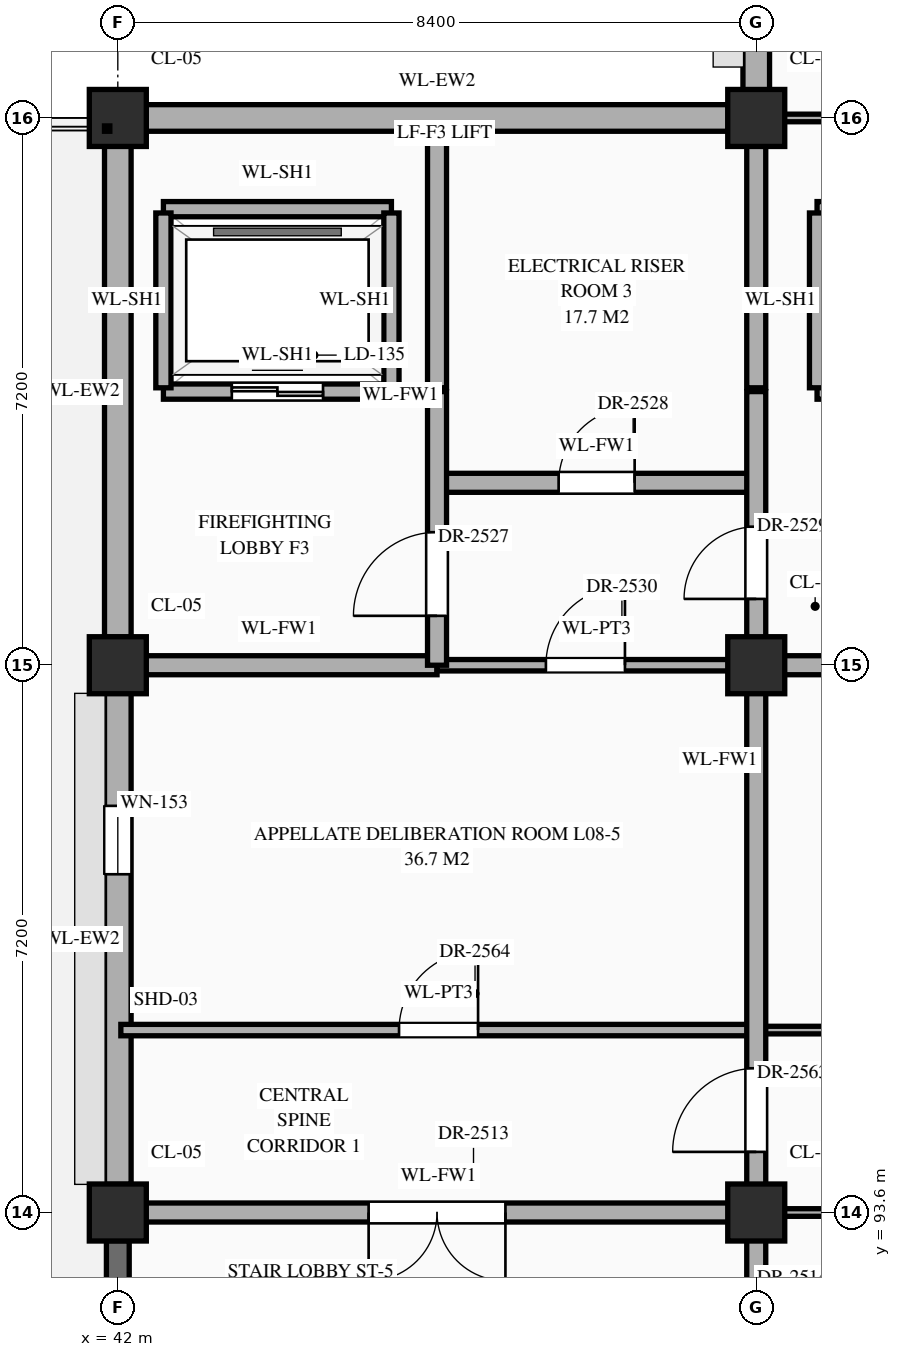
"""IFC4 building model, lengths in metres.
Left out: names, types, materials, properties, quantities, classifications, styles, units other than length and angle.
Written with IfcOpenShell. Run it as: python <this file> out.ifc"""

import sys

from ifc_helpers import new_model, si_unit, direction, frame, frame_2d, origin, origin_2d, place, context, subcontext, project, spatial, rectangle, extrude, element, fill, save


model = new_model("IFC4")
c1 = context("Model", 3, precision=1e-05, world=origin(), true_north=direction((0.0, 1.0)))
c2 = subcontext(c1, "Body", "Model", "MODEL_VIEW")
j1 = project(units=[si_unit("LENGTHUNIT", "METRE"), si_unit("PLANEANGLEUNIT", "RADIAN")], contexts=[c1])
p1 = place(None, origin())
s1 = spatial("IfcSite", under=j1, at=p1, CompositionType="ELEMENT")
p2 = place(p1, origin())
s2 = spatial("IfcBuilding", under=s1, at=p2, CompositionType="ELEMENT")
p3 = place(p2, frame((0.0, 0.0, 35.1)))
s3 = spatial("IfcBuildingStorey", under=s2, at=p3, CompositionType="ELEMENT", Elevation=35.1)
for number, where, z_axis, x_axis in (
    (1, (42.0, 93.6, 0.0), (0.0, 0.0, 1.0), (1.0, 0.0, 0.0)),
    (2, (42.0, 100.8, 0.0), (0.0, 0.0, 1.0), (1.0, 0.0, 0.0)),
    (3, (42.0, 108.0, 0.0), (0.0, 0.0, 1.0), (1.0, 0.0, 0.0)),
    (4, (50.4, 93.6, 0.0), (0.0, 0.0, 1.0), (1.0, 0.0, 0.0)),
    (5, (50.4, 100.8, 0.0), (0.0, 0.0, 1.0), (1.0, 0.0, 0.0)),
    (6, (50.4, 108.0, 0.0), (0.0, 0.0, 1.0), (1.0, 0.0, 0.0)),
):
    element("IfcColumn", number, at=place(p3, frame(where, z_axis=z_axis, x_axis=x_axis)), inside=s3, PredefinedType="COLUMN", context=c2, shape_type="SweptSolid", body=[
        extrude(rectangle(XDim=0.75, YDim=0.75, at=origin_2d()), origin(), (0.0, 0.0, 1.0), 4.2),
    ])
p4 = place(p3, frame((42.0, 86.77, 0.0), z_axis=(0.0, 0.0, 1.0), x_axis=(0.0, 1.0, 0.0)))
e7 = element("IfcWall", 7, at=p4, inside=s3, PredefinedType="SHEAR", context=c2, shape_type="SweptSolid", body=[
    extrude(rectangle(XDim=6.46, YDim=0.3, at=frame_2d((3.23, 0.0))), origin(), (0.0, 0.0, 1.0), 3.95),
])
p5 = place(p3, frame((42.0, 93.97, 0.0), z_axis=(0.0, 0.0, 1.0), x_axis=(0.0, 1.0, 0.0)))
e8 = element("IfcWall", 8, at=p5, inside=s3, PredefinedType="STANDARD", context=c2, shape_type="SweptSolid", body=[
    extrude(rectangle(XDim=6.46, YDim=0.35, at=frame_2d((3.23, 0.0))), origin(), (0.0, 0.0, 1.0), 3.3),
])
p6 = place(p5, frame((4.08, 0.0, 0.85)))
e9 = element("IfcOpeningElement", 9, at=p6, cuts=e8, PredefinedType="OPENING", context=c2, shape_type="SweptSolid", body=[
    extrude(rectangle(XDim=0.9, YDim=1.56, at=frame_2d((0.45, 0.78))), frame((0.0, 0.187, 0.0), z_axis=(0.0, -1.0, 0.0), x_axis=(1.0, 0.0, 0.0)), (0.0, 0.0, 1.0), 0.374),
])
p7 = place(p3, frame((42.37, 108.0, 0.0), z_axis=(0.0, 0.0, 1.0), x_axis=(1.0, 0.0, 0.0)))
e10 = element("IfcWall", 10, at=p7, inside=s3, PredefinedType="STANDARD", context=c2, shape_type="SweptSolid", body=[
    extrude(rectangle(XDim=7.66, YDim=0.35, at=frame_2d((3.83, 0.0))), origin(), (0.0, 0.0, 1.0), 3.3),
])
p8 = place(p3, frame((42.0, 101.17, 0.0), z_axis=(0.0, 0.0, 1.0), x_axis=(0.0, 1.0, 0.0)))
e11 = element("IfcWall", 11, at=p8, inside=s3, PredefinedType="STANDARD", context=c2, shape_type="SweptSolid", body=[
    extrude(rectangle(XDim=6.46, YDim=0.35, at=frame_2d((3.23, 0.0))), origin(), (0.0, 0.0, 1.0), 3.3),
])
p9 = place(p3, frame((50.4, 108.37, 0.0), z_axis=(0.0, 0.0, 1.0), x_axis=(0.0, 1.0, 0.0)))
e12 = element("IfcWall", 12, at=p9, inside=s3, PredefinedType="STANDARD", context=c2, shape_type="SweptSolid", body=[
    extrude(rectangle(XDim=6.46, YDim=0.35, at=frame_2d((3.23, 0.0))), origin(), (0.0, 0.0, 1.0), 3.3),
])
p10 = place(p9, frame((4.08, 0.0, 0.85)))
e13 = element("IfcOpeningElement", 13, at=p10, cuts=e12, PredefinedType="OPENING", context=c2, shape_type="SweptSolid", body=[
    extrude(rectangle(XDim=0.9, YDim=2.12, at=frame_2d((0.45, 1.06))), frame((0.0, 0.187, 0.0), z_axis=(0.0, -1.0, 0.0), x_axis=(1.0, 0.0, 0.0)), (0.0, 0.0, 1.0), 0.374),
])
p11 = place(p3, frame((42.04, 93.6, 0.0), z_axis=(0.0, 0.0, 1.0), x_axis=(1.0, 0.0, 0.0)))
e14 = element("IfcWall", 14, at=p11, inside=s3, PredefinedType="STANDARD", context=c2, shape_type="SweptSolid", body=[
    extrude(rectangle(XDim=8.36, YDim=0.25, at=frame_2d((4.18, 0.0))), origin(), (0.0, 0.0, 1.0), 3.1),
])
p12 = place(p11, frame((3.26, 0.0, 0.0)))
e15 = element("IfcOpeningElement", 15, at=p12, cuts=e14, PredefinedType="OPENING", context=c2, shape_type="SweptSolid", body=[
    extrude(rectangle(XDim=1.8, YDim=2.35, at=frame_2d((0.9, 1.175))), frame((0.0, 0.137, 0.0), z_axis=(0.0, -1.0, 0.0), x_axis=(1.0, 0.0, 0.0)), (0.0, 0.0, 1.0), 0.274),
])
p13 = place(p3, frame((50.4, 93.6, 0.0), z_axis=(0.0, 0.0, 1.0), x_axis=(1.0, 0.0, 0.0)))
e16 = element("IfcWall", 16, at=p13, inside=s3, PredefinedType="STANDARD", context=c2, shape_type="SweptSolid", body=[
    extrude(rectangle(XDim=8.4, YDim=0.1, at=frame_2d((4.2, 0.0))), origin(), (0.0, 0.0, 1.0), 3.1),
])
p14 = place(p13, frame((1.058, 0.0, 0.0)))
e17 = element("IfcOpeningElement", 17, at=p14, cuts=e16, PredefinedType="OPENING", context=c2, shape_type="SweptSolid", body=[
    extrude(rectangle(XDim=0.98, YDim=2.35, at=frame_2d((0.49, 1.175))), frame((0.0, 0.062, 0.0), z_axis=(0.0, -1.0, 0.0), x_axis=(1.0, 0.0, 0.0)), (0.0, 0.0, 1.0), 0.124),
])
p15 = place(p13, frame((3.69, 0.0, 0.0)))
e18 = element("IfcOpeningElement", 18, at=p15, cuts=e16, PredefinedType="OPENING", context=c2, shape_type="SweptSolid", body=[
    extrude(rectangle(XDim=1.02, YDim=2.4, at=frame_2d((0.51, 1.2))), frame((0.0, 0.062, 0.0), z_axis=(0.0, -1.0, 0.0), x_axis=(1.0, 0.0, 0.0)), (0.0, 0.0, 1.0), 0.124),
])
p16 = place(p13, frame((6.323, 0.0, 0.0)))
e19 = element("IfcOpeningElement", 19, at=p16, cuts=e16, PredefinedType="OPENING", context=c2, shape_type="SweptSolid", body=[
    extrude(rectangle(XDim=1.06, YDim=2.4, at=frame_2d((0.53, 1.2))), frame((0.0, 0.062, 0.0), z_axis=(0.0, -1.0, 0.0), x_axis=(1.0, 0.0, 0.0)), (0.0, 0.0, 1.0), 0.124),
])
p17 = place(p3, frame((42.04, 96.0, 0.0), z_axis=(0.0, 0.0, 1.0), x_axis=(1.0, 0.0, 0.0)))
e20 = element("IfcWall", 20, at=p17, inside=s3, PredefinedType="STANDARD", context=c2, shape_type="SweptSolid", body=[
    extrude(rectangle(XDim=8.36, YDim=0.15, at=frame_2d((4.18, 0.0))), origin(), (0.0, 0.0, 1.0), 3.95),
])
p18 = place(p17, frame((3.66, 0.0, 0.0)))
e21 = element("IfcOpeningElement", 21, at=p18, cuts=e20, PredefinedType="OPENING", context=c2, shape_type="SweptSolid", body=[
    extrude(rectangle(XDim=1.04, YDim=2.2, at=frame_2d((0.52, 1.1))), frame((0.0, 0.087, 0.0), z_axis=(0.0, -1.0, 0.0), x_axis=(1.0, 0.0, 0.0)), (0.0, 0.0, 1.0), 0.174),
])
p19 = place(p3, frame((50.4, 96.0, 0.0), z_axis=(0.0, 0.0, 1.0), x_axis=(1.0, 0.0, 0.0)))
e22 = element("IfcWall", 22, at=p19, inside=s3, PredefinedType="STANDARD", context=c2, shape_type="SweptSolid", body=[
    extrude(rectangle(XDim=5.8, YDim=0.1, at=frame_2d((2.9, 0.0))), origin(), (0.0, 0.0, 1.0), 3.95),
])
p20 = place(p19, frame((1.14, 0.0, 0.0)))
e23 = element("IfcOpeningElement", 23, at=p20, cuts=e22, PredefinedType="OPENING", context=c2, shape_type="SweptSolid", body=[
    extrude(rectangle(XDim=1.12, YDim=2.25, at=frame_2d((0.56, 1.125))), frame((0.0, 0.062, 0.0), z_axis=(0.0, -1.0, 0.0), x_axis=(1.0, 0.0, 0.0)), (0.0, 0.0, 1.0), 0.124),
])
p21 = place(p19, frame((4.02, 0.0, 0.0)))
e24 = element("IfcOpeningElement", 24, at=p21, cuts=e22, PredefinedType="OPENING", context=c2, shape_type="SweptSolid", body=[
    extrude(rectangle(XDim=1.16, YDim=2.3, at=frame_2d((0.58, 1.15))), frame((0.0, 0.062, 0.0), z_axis=(0.0, -1.0, 0.0), x_axis=(1.0, 0.0, 0.0)), (0.0, 0.0, 1.0), 0.124),
])
p22 = place(p3, frame((42.04, 100.8, 0.0), z_axis=(0.0, 0.0, 1.0), x_axis=(1.0, 0.0, 0.0)))
e25 = element("IfcWall", 25, at=p22, inside=s3, PredefinedType="STANDARD", context=c2, shape_type="SweptSolid", body=[
    extrude(rectangle(XDim=4.16, YDim=0.25, at=frame_2d((2.08, 0.0))), origin(), (0.0, 0.0, 1.0), 3.1),
])
p23 = place(p3, frame((46.2, 100.8, 0.0), z_axis=(0.0, 0.0, 1.0), x_axis=(1.0, 0.0, 0.0)))
e26 = element("IfcWall", 26, at=p23, inside=s3, PredefinedType="STANDARD", context=c2, shape_type="SweptSolid", body=[
    extrude(rectangle(XDim=4.2, YDim=0.15, at=frame_2d((2.1, 0.0))), origin(), (0.0, 0.0, 1.0), 3.1),
])
p24 = place(p23, frame((1.433, 0.0, 0.0)))
e27 = element("IfcOpeningElement", 27, at=p24, cuts=e26, PredefinedType="OPENING", context=c2, shape_type="SweptSolid", body=[
    extrude(rectangle(XDim=1.04, YDim=2.2, at=frame_2d((0.52, 1.1))), frame((0.0, 0.087, 0.0), z_axis=(0.0, -1.0, 0.0), x_axis=(1.0, 0.0, 0.0)), (0.0, 0.0, 1.0), 0.174),
])
p25 = place(p3, frame((50.4, 100.8, 0.0), z_axis=(0.0, 0.0, 1.0), x_axis=(1.0, 0.0, 0.0)))
e28 = element("IfcWall", 28, at=p25, inside=s3, PredefinedType="STANDARD", context=c2, shape_type="SweptSolid", body=[
    extrude(rectangle(XDim=3.4, YDim=0.25, at=frame_2d((1.7, 0.0))), origin(), (0.0, 0.0, 1.0), 3.1),
])
p26 = place(p25, frame((1.373, 0.0, 0.0)))
e29 = element("IfcOpeningElement", 29, at=p26, cuts=e28, PredefinedType="OPENING", context=c2, shape_type="SweptSolid", body=[
    extrude(rectangle(XDim=0.95, YDim=2.15, at=frame_2d((0.475, 1.075))), frame((0.0, 0.137, 0.0), z_axis=(0.0, -1.0, 0.0), x_axis=(1.0, 0.0, 0.0)), (0.0, 0.0, 1.0), 0.274),
])
p27 = place(p3, frame((46.2, 103.2, 0.0), z_axis=(0.0, 0.0, 1.0), x_axis=(1.0, 0.0, 0.0)))
e30 = element("IfcWall", 30, at=p27, inside=s3, PredefinedType="STANDARD", context=c2, shape_type="SweptSolid", body=[
    extrude(rectangle(XDim=4.2, YDim=0.25, at=frame_2d((2.1, 0.0))), origin(), (0.0, 0.0, 1.0), 3.95),
])
p28 = place(p27, frame((1.6, 0.0, 0.0)))
e31 = element("IfcOpeningElement", 31, at=p28, cuts=e30, PredefinedType="OPENING", context=c2, shape_type="SweptSolid", body=[
    extrude(rectangle(XDim=1.0, YDim=2.2, at=frame_2d((0.5, 1.1))), frame((0.0, 0.137, 0.0), z_axis=(0.0, -1.0, 0.0), x_axis=(1.0, 0.0, 0.0)), (0.0, 0.0, 1.0), 0.274),
])
p29 = place(p3, frame((42.6, 104.4, 0.0), z_axis=(0.0, 0.0, 1.0), x_axis=(1.0, 0.0, 0.0)))
e32 = element("IfcWall", 32, at=p29, inside=s3, PredefinedType="STANDARD", context=c2, shape_type="SweptSolid", body=[
    extrude(rectangle(XDim=3.0, YDim=0.2, at=frame_2d((1.5, 0.0))), origin(), (0.0, 0.0, 1.0), 3.95),
])
p30 = place(p29, frame((0.9, 0.0, 0.0)))
e33 = element("IfcOpeningElement", 33, at=p30, cuts=e32, PredefinedType="OPENING", context=c2, shape_type="SweptSolid", body=[
    extrude(rectangle(XDim=1.2, YDim=2.15, at=frame_2d((0.6, 1.075))), frame((0.0, 0.112, 0.0), z_axis=(0.0, -1.0, 0.0), x_axis=(1.0, 0.0, 0.0)), (0.0, 0.0, 1.0), 0.224),
])
p31 = place(p3, frame((51.2, 104.4, 0.0), z_axis=(0.0, 0.0, 1.0), x_axis=(1.0, 0.0, 0.0)))
e34 = element("IfcWall", 34, at=p31, inside=s3, PredefinedType="STANDARD", context=c2, shape_type="SweptSolid", body=[
    extrude(rectangle(XDim=2.4, YDim=0.2, at=frame_2d((1.2, 0.0))), origin(), (0.0, 0.0, 1.0), 3.95),
])
p32 = place(p31, frame((0.675, 0.0, 0.0)))
e35 = element("IfcOpeningElement", 35, at=p32, cuts=e34, PredefinedType="OPENING", context=c2, shape_type="SweptSolid", body=[
    extrude(rectangle(XDim=1.05, YDim=2.15, at=frame_2d((0.525, 1.075))), frame((0.0, 0.112, 0.0), z_axis=(0.0, -1.0, 0.0), x_axis=(1.0, 0.0, 0.0)), (0.0, 0.0, 1.0), 0.224),
])
p33 = place(p3, frame((42.6, 106.8, 0.0), z_axis=(0.0, 0.0, 1.0), x_axis=(1.0, 0.0, 0.0)))
e36 = element("IfcWall", 36, at=p33, inside=s3, PredefinedType="STANDARD", context=c2, shape_type="SweptSolid", body=[
    extrude(rectangle(XDim=3.0, YDim=0.2, at=frame_2d((1.5, 0.0))), origin(), (0.0, 0.0, 1.0), 3.95),
])
p34 = place(p3, frame((51.2, 106.8, 0.0), z_axis=(0.0, 0.0, 1.0), x_axis=(1.0, 0.0, 0.0)))
e37 = element("IfcWall", 37, at=p34, inside=s3, PredefinedType="STANDARD", context=c2, shape_type="SweptSolid", body=[
    extrude(rectangle(XDim=2.4, YDim=0.2, at=frame_2d((1.2, 0.0))), origin(), (0.0, 0.0, 1.0), 3.95),
])
p35 = place(p3, frame((50.45, 108.0, 0.0), z_axis=(0.0, 0.0, 1.0), x_axis=(1.0, 0.0, 0.0)))
e38 = element("IfcWall", 38, at=p35, inside=s3, PredefinedType="STANDARD", context=c2, shape_type="SweptSolid", body=[
    extrude(rectangle(XDim=4.1, YDim=0.1, at=frame_2d((2.05, 0.0))), origin(), (0.0, 0.0, 1.0), 3.1),
])
for number, where, z_axis, x_axis in (
    (39, (42.6, 104.45, 0.0), (0.0, 0.0, 1.0), (0.0, 1.0, 0.0)),
    (40, (45.6, 104.45, 0.0), (0.0, 0.0, 1.0), (0.0, 1.0, 0.0)),
):
    element("IfcWall", number, at=place(p3, frame(where, z_axis=z_axis, x_axis=x_axis)), inside=s3, PredefinedType="STANDARD", context=c2, shape_type="SweptSolid", body=[
        extrude(rectangle(XDim=2.3, YDim=0.2, at=frame_2d((1.15, 0.0))), origin(), (0.0, 0.0, 1.0), 3.95),
    ])
p36 = place(p3, frame((46.2, 100.8, 0.0), z_axis=(0.0, 0.0, 1.0), x_axis=(0.0, 1.0, 0.0)))
e41 = element("IfcWall", 41, at=p36, inside=s3, PredefinedType="STANDARD", context=c2, shape_type="SweptSolid", body=[
    extrude(rectangle(XDim=3.6, YDim=0.25, at=frame_2d((1.8, 0.0))), origin(), (0.0, 0.0, 1.0), 3.95),
])
p37 = place(p36, frame((0.65, 0.0, 0.0)))
e42 = element("IfcOpeningElement", 42, at=p37, cuts=e41, PredefinedType="OPENING", context=c2, shape_type="SweptSolid", body=[
    extrude(rectangle(XDim=1.1, YDim=2.2, at=frame_2d((0.55, 1.1))), frame((0.0, 0.137, 0.0), z_axis=(0.0, -1.0, 0.0), x_axis=(1.0, 0.0, 0.0)), (0.0, 0.0, 1.0), 0.274),
])
p38 = place(p3, frame((46.2, 104.45, 0.0), z_axis=(0.0, 0.0, 1.0), x_axis=(0.0, 1.0, 0.0)))
e43 = element("IfcWall", 43, at=p38, inside=s3, PredefinedType="STANDARD", context=c2, shape_type="SweptSolid", body=[
    extrude(rectangle(XDim=3.46, YDim=0.25, at=frame_2d((1.73, 0.0))), origin(), (0.0, 0.0, 1.0), 3.95),
])
p39 = place(p3, frame((50.4, 91.2, 0.0), z_axis=(0.0, 0.0, 1.0), x_axis=(0.0, 1.0, 0.0)))
e44 = element("IfcWall", 44, at=p39, inside=s3, PredefinedType="STANDARD", context=c2, shape_type="SweptSolid", body=[
    extrude(rectangle(XDim=13.2, YDim=0.25, at=frame_2d((6.6, 0.0))), origin(), (0.0, 0.0, 1.0), 3.2),
])
p40 = place(p39, frame((0.577, 0.0, 0.0)))
e45 = element("IfcOpeningElement", 45, at=p40, cuts=e44, PredefinedType="OPENING", context=c2, shape_type="SweptSolid", body=[
    extrude(rectangle(XDim=0.95, YDim=2.15, at=frame_2d((0.475, 1.075))), frame((0.0, 0.137, 0.0), z_axis=(0.0, -1.0, 0.0), x_axis=(1.0, 0.0, 0.0)), (0.0, 0.0, 1.0), 0.274),
])
p41 = place(p39, frame((10.472, 0.0, 0.0)))
e46 = element("IfcOpeningElement", 46, at=p41, cuts=e44, PredefinedType="OPENING", context=c2, shape_type="SweptSolid", body=[
    extrude(rectangle(XDim=0.95, YDim=2.15, at=frame_2d((0.475, 1.075))), frame((0.0, 0.137, 0.0), z_axis=(0.0, -1.0, 0.0), x_axis=(1.0, 0.0, 0.0)), (0.0, 0.0, 1.0), 0.274),
])
p42 = place(p39, frame((3.198, 0.0, 0.0)))
e47 = element("IfcOpeningElement", 47, at=p42, cuts=e44, PredefinedType="OPENING", context=c2, shape_type="SweptSolid", body=[
    extrude(rectangle(XDim=1.1, YDim=2.2, at=frame_2d((0.55, 1.1))), frame((0.0, 0.137, 0.0), z_axis=(0.0, -1.0, 0.0), x_axis=(1.0, 0.0, 0.0)), (0.0, 0.0, 1.0), 0.274),
])
p43 = place(p3, frame((50.4, 104.45, 0.0), z_axis=(0.0, 0.0, 1.0), x_axis=(0.0, 1.0, 0.0)))
e48 = element("IfcWall", 48, at=p43, inside=s3, PredefinedType="STANDARD", context=c2, shape_type="SweptSolid", body=[
    extrude(rectangle(XDim=3.46, YDim=0.25, at=frame_2d((1.73, 0.0))), origin(), (0.0, 0.0, 1.0), 3.2),
])
p44 = place(p3, frame((51.2, 104.45, 0.0), z_axis=(0.0, 0.0, 1.0), x_axis=(0.0, 1.0, 0.0)))
e49 = element("IfcWall", 49, at=p44, inside=s3, PredefinedType="STANDARD", context=c2, shape_type="SweptSolid", body=[
    extrude(rectangle(XDim=2.3, YDim=0.2, at=frame_2d((1.15, 0.0))), origin(), (0.0, 0.0, 1.0), 3.95),
])
p45 = place(p6, origin())
e50 = element("IfcWindow", 50, at=p45, inside=s3, PartitioningType="SINGLE_PANEL", PredefinedType="WINDOW", context=c2, shape_type="SweptSolid", body=[
    extrude(rectangle(XDim=0.9, YDim=1.56, at=frame_2d((0.45, 0.78))), frame((0.0, 0.03, 0.0), z_axis=(0.0, -1.0, 0.0), x_axis=(1.0, 0.0, 0.0)), (0.0, 0.0, 1.0), 0.06),
])
fill(e9, e50)
p46 = place(p30, origin())
e51 = element("IfcDoor", 51, at=p46, inside=s3, OperationType="DOUBLE_DOOR_SLIDING", PredefinedType="DOOR", context=c2, shape_type="SweptSolid", body=[
    extrude(rectangle(XDim=1.2, YDim=2.15, at=frame_2d((0.6, 1.075))), frame((0.0, 0.025, 0.0), z_axis=(0.0, -1.0, 0.0), x_axis=(1.0, 0.0, 0.0)), (0.0, 0.0, 1.0), 0.05),
])
fill(e33, e51)
p47 = place(p12, frame((1.8, 0.0, 0.0), z_axis=(0.0, 0.0, 1.0), x_axis=(-1.0, 0.0, 0.0)))
e52 = element("IfcDoor", 52, at=p47, inside=s3, OperationType="DOUBLE_DOOR_SINGLE_SWING", PredefinedType="DOOR", context=c2, shape_type="SweptSolid", body=[
    extrude(rectangle(XDim=1.8, YDim=2.35, at=frame_2d((0.9, 1.175))), frame((0.0, 0.025, 0.0), z_axis=(0.0, -1.0, 0.0), x_axis=(1.0, 0.0, 0.0)), (0.0, 0.0, 1.0), 0.05),
])
fill(e15, e52)
p48 = place(p37, origin())
e53 = element("IfcDoor", 53, at=p48, inside=s3, OperationType="SINGLE_SWING_LEFT", PredefinedType="DOOR", context=c2, shape_type="SweptSolid", body=[
    extrude(rectangle(XDim=1.1, YDim=2.2, at=frame_2d((0.55, 1.1))), frame((0.0, 0.025, 0.0), z_axis=(0.0, -1.0, 0.0), x_axis=(1.0, 0.0, 0.0)), (0.0, 0.0, 1.0), 0.05),
])
fill(e42, e53)
p49 = place(p28, origin())
e54 = element("IfcDoor", 54, at=p49, inside=s3, OperationType="SINGLE_SWING_RIGHT", PredefinedType="DOOR", context=c2, shape_type="SweptSolid", body=[
    extrude(rectangle(XDim=1.0, YDim=2.2, at=frame_2d((0.5, 1.1))), frame((0.0, 0.025, 0.0), z_axis=(0.0, -1.0, 0.0), x_axis=(1.0, 0.0, 0.0)), (0.0, 0.0, 1.0), 0.05),
])
fill(e31, e54)
p50 = place(p41, origin())
e55 = element("IfcDoor", 55, at=p50, inside=s3, OperationType="SINGLE_SWING_LEFT", PredefinedType="DOOR", context=c2, shape_type="SweptSolid", body=[
    extrude(rectangle(XDim=0.95, YDim=2.15, at=frame_2d((0.475, 1.075))), frame((0.0, 0.025, 0.0), z_axis=(0.0, -1.0, 0.0), x_axis=(1.0, 0.0, 0.0)), (0.0, 0.0, 1.0), 0.05),
])
fill(e46, e55)
p51 = place(p24, origin())
e56 = element("IfcDoor", 56, at=p51, inside=s3, OperationType="SINGLE_SWING_RIGHT", PredefinedType="DOOR", context=c2, shape_type="SweptSolid", body=[
    extrude(rectangle(XDim=1.04, YDim=2.2, at=frame_2d((0.52, 1.1))), frame((0.0, 0.025, 0.0), z_axis=(0.0, -1.0, 0.0), x_axis=(1.0, 0.0, 0.0)), (0.0, 0.0, 1.0), 0.05),
])
fill(e27, e56)
p52 = place(p42, origin())
e57 = element("IfcDoor", 57, at=p52, inside=s3, OperationType="SINGLE_SWING_LEFT", PredefinedType="DOOR", context=c2, shape_type="SweptSolid", body=[
    extrude(rectangle(XDim=1.1, YDim=2.2, at=frame_2d((0.55, 1.1))), frame((0.0, 0.025, 0.0), z_axis=(0.0, -1.0, 0.0), x_axis=(1.0, 0.0, 0.0)), (0.0, 0.0, 1.0), 0.05),
])
fill(e47, e57)
p53 = place(p18, origin())
e58 = element("IfcDoor", 58, at=p53, inside=s3, OperationType="SINGLE_SWING_RIGHT", PredefinedType="DOOR", context=c2, shape_type="SweptSolid", body=[
    extrude(rectangle(XDim=1.04, YDim=2.2, at=frame_2d((0.52, 1.1))), frame((0.0, 0.025, 0.0), z_axis=(0.0, -1.0, 0.0), x_axis=(1.0, 0.0, 0.0)), (0.0, 0.0, 1.0), 0.05),
])
fill(e21, e58)
save(model, sys.argv[1])
